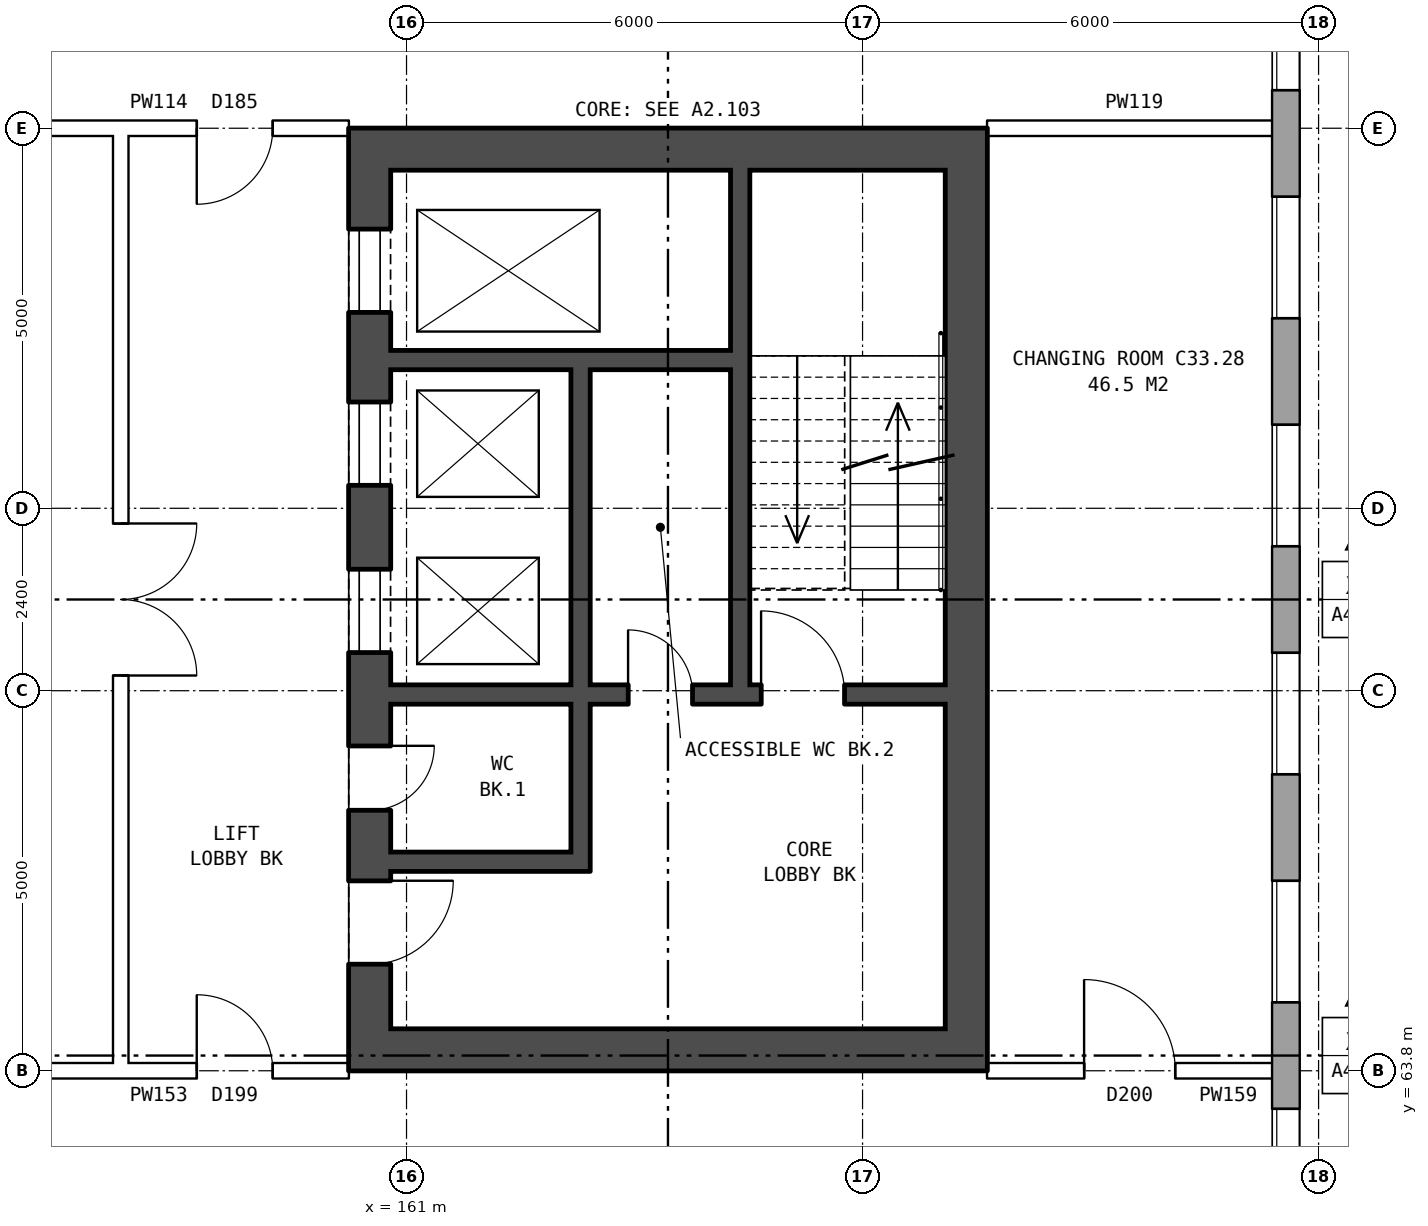
"""IFC4 building model, lengths in metres.
Left out: names, types, materials, properties, quantities, classifications, styles, units other than length and angle.
Written with IfcOpenShell. Run it as: python <this file> out.ifc"""

import sys

from ifc_helpers import new_model, si_unit, direction, frame, frame_2d, origin, place, context, subcontext, project, spatial, rectangle, extrude, element, fill, save


model = new_model("IFC4")
c1 = context("Model", 3, precision=1e-05, world=origin(), true_north=direction((0.0, 1.0)))
c2 = subcontext(c1, "Body", "Model", "MODEL_VIEW")
j1 = project(units=[si_unit("LENGTHUNIT", "METRE"), si_unit("PLANEANGLEUNIT", "RADIAN")], contexts=[c1])
p1 = place(None, origin())
s1 = spatial("IfcSite", under=j1, at=p1, CompositionType="ELEMENT")
p2 = place(p1, origin())
s2 = spatial("IfcBuilding", under=s1, at=p2, CompositionType="ELEMENT")
p3 = place(p2, frame((0.0, 0.0, 119.5)))
s3 = spatial("IfcBuildingStorey", under=s2, at=p3, CompositionType="ELEMENT", Elevation=119.5)
p4 = place(p3, frame((172.57, 57.075, 0.0), z_axis=(0.0, 0.0, 1.0), x_axis=(0.0, 1.0, 0.0)))
e1 = element("IfcWall", 1, at=p4, inside=s3, PredefinedType="STANDARD", context=c2, shape_type="SweptSolid", body=[
    extrude(rectangle(XDim=25.851, YDim=0.36, at=frame_2d((12.925, 0.0))), origin(), (0.0, 0.0, 1.0), 3.6),
])
p5 = place(p4, frame((1.625, 0.0, 0.8)))
e2 = element("IfcOpeningElement", 2, at=p5, cuts=e1, PredefinedType="OPENING", context=c2, shape_type="SweptSolid", body=[
    extrude(rectangle(XDim=1.6, YDim=1.8, at=frame_2d((0.8, 0.9))), frame((0.0, 0.19, 0.0), z_axis=(0.0, -1.0, 0.0), x_axis=(1.0, 0.0, 0.0)), (0.0, 0.0, 1.0), 0.38),
])
p6 = place(p4, frame((4.625, 0.0, 0.8)))
e3 = element("IfcOpeningElement", 3, at=p6, cuts=e1, PredefinedType="OPENING", context=c2, shape_type="SweptSolid", body=[
    extrude(rectangle(XDim=1.6, YDim=1.8, at=frame_2d((0.8, 0.9))), frame((0.0, 0.19, 0.0), z_axis=(0.0, -1.0, 0.0), x_axis=(1.0, 0.0, 0.0)), (0.0, 0.0, 1.0), 0.38),
])
p7 = place(p4, frame((7.625, 0.0, 0.8)))
e4 = element("IfcOpeningElement", 4, at=p7, cuts=e1, PredefinedType="OPENING", context=c2, shape_type="SweptSolid", body=[
    extrude(rectangle(XDim=1.6, YDim=1.8, at=frame_2d((0.8, 0.9))), frame((0.0, 0.19, 0.0), z_axis=(0.0, -1.0, 0.0), x_axis=(1.0, 0.0, 0.0)), (0.0, 0.0, 1.0), 0.38),
])
p8 = place(p4, frame((10.625, 0.0, 0.8)))
e5 = element("IfcOpeningElement", 5, at=p8, cuts=e1, PredefinedType="OPENING", context=c2, shape_type="SweptSolid", body=[
    extrude(rectangle(XDim=1.6, YDim=1.8, at=frame_2d((0.8, 0.9))), frame((0.0, 0.19, 0.0), z_axis=(0.0, -1.0, 0.0), x_axis=(1.0, 0.0, 0.0)), (0.0, 0.0, 1.0), 0.38),
])
p9 = place(p4, frame((13.625, 0.0, 0.8)))
e6 = element("IfcOpeningElement", 6, at=p9, cuts=e1, PredefinedType="OPENING", context=c2, shape_type="SweptSolid", body=[
    extrude(rectangle(XDim=1.6, YDim=1.8, at=frame_2d((0.8, 0.9))), frame((0.0, 0.19, 0.0), z_axis=(0.0, -1.0, 0.0), x_axis=(1.0, 0.0, 0.0)), (0.0, 0.0, 1.0), 0.38),
])
p10 = place(p4, frame((16.625, 0.0, 0.8)))
e7 = element("IfcOpeningElement", 7, at=p10, cuts=e1, PredefinedType="OPENING", context=c2, shape_type="SweptSolid", body=[
    extrude(rectangle(XDim=1.6, YDim=1.8, at=frame_2d((0.8, 0.9))), frame((0.0, 0.19, 0.0), z_axis=(0.0, -1.0, 0.0), x_axis=(1.0, 0.0, 0.0)), (0.0, 0.0, 1.0), 0.38),
])
p11 = place(p4, frame((19.625, 0.0, 0.8)))
e8 = element("IfcOpeningElement", 8, at=p11, cuts=e1, PredefinedType="OPENING", context=c2, shape_type="SweptSolid", body=[
    extrude(rectangle(XDim=1.6, YDim=1.8, at=frame_2d((0.8, 0.9))), frame((0.0, 0.19, 0.0), z_axis=(0.0, -1.0, 0.0), x_axis=(1.0, 0.0, 0.0)), (0.0, 0.0, 1.0), 0.38),
])
p12 = place(p4, frame((22.625, 0.0, 0.8)))
e9 = element("IfcOpeningElement", 9, at=p12, cuts=e1, PredefinedType="OPENING", context=c2, shape_type="SweptSolid", body=[
    extrude(rectangle(XDim=1.6, YDim=1.8, at=frame_2d((0.8, 0.9))), frame((0.0, 0.19, 0.0), z_axis=(0.0, -1.0, 0.0), x_axis=(1.0, 0.0, 0.0)), (0.0, 0.0, 1.0), 0.38),
])
p13 = place(p3, frame((160.515, 76.2, 0.0), z_axis=(0.0, 0.0, 1.0), x_axis=(0.0, -1.0, 0.0)))
e10 = element("IfcWall", 10, at=p13, inside=s3, PredefinedType="SHEAR", context=c2, shape_type="SweptSolid", body=[
    extrude(rectangle(XDim=12.4, YDim=0.55, at=frame_2d((6.2, 0.0))), origin(), (0.0, 0.0, 1.0), 3.6),
])
p14 = place(p13, frame((1.325, 0.0, 0.0)))
e11 = element("IfcOpeningElement", 11, at=p14, cuts=e10, PredefinedType="OPENING", context=c2, shape_type="SweptSolid", body=[
    extrude(rectangle(XDim=1.1, YDim=2.1, at=frame_2d((0.55, 1.05))), frame((0.0, 0.285, 0.0), z_axis=(0.0, -1.0, 0.0), x_axis=(1.0, 0.0, 0.0)), (0.0, 0.0, 1.0), 0.57),
])
p15 = place(p13, frame((3.6, 0.0, 0.0)))
e12 = element("IfcOpeningElement", 12, at=p15, cuts=e10, PredefinedType="OPENING", context=c2, shape_type="SweptSolid", body=[
    extrude(rectangle(XDim=1.1, YDim=2.1, at=frame_2d((0.55, 1.05))), frame((0.0, 0.285, 0.0), z_axis=(0.0, -1.0, 0.0), x_axis=(1.0, 0.0, 0.0)), (0.0, 0.0, 1.0), 0.57),
])
p16 = place(p13, frame((5.8, 0.0, 0.0)))
e13 = element("IfcOpeningElement", 13, at=p16, cuts=e10, PredefinedType="OPENING", context=c2, shape_type="SweptSolid", body=[
    extrude(rectangle(XDim=1.1, YDim=2.1, at=frame_2d((0.55, 1.05))), frame((0.0, 0.285, 0.0), z_axis=(0.0, -1.0, 0.0), x_axis=(1.0, 0.0, 0.0)), (0.0, 0.0, 1.0), 0.57),
])
p17 = place(p13, frame((9.9, 0.0, 0.0)))
e14 = element("IfcOpeningElement", 14, at=p17, cuts=e10, PredefinedType="OPENING", context=c2, shape_type="SweptSolid", body=[
    extrude(rectangle(XDim=1.1, YDim=2.1, at=frame_2d((0.55, 1.05))), frame((0.0, 0.285, 0.0), z_axis=(0.0, -1.0, 0.0), x_axis=(1.0, 0.0, 0.0)), (0.0, 0.0, 1.0), 0.57),
])
p18 = place(p13, frame((8.125, 0.0, 0.0)))
e15 = element("IfcOpeningElement", 15, at=p18, cuts=e10, PredefinedType="OPENING", context=c2, shape_type="SweptSolid", body=[
    extrude(rectangle(XDim=0.85, YDim=2.1, at=frame_2d((0.425, 1.05))), frame((0.0, 0.285, 0.0), z_axis=(0.0, -1.0, 0.0), x_axis=(1.0, 0.0, 0.0)), (0.0, 0.0, 1.0), 0.57),
])
p19 = place(p3, frame((168.365, 76.2, 0.0), z_axis=(0.0, 0.0, 1.0), x_axis=(0.0, -1.0, 0.0)))
e16 = element("IfcWall", 16, at=p19, inside=s3, PredefinedType="SHEAR", context=c2, shape_type="SweptSolid", body=[
    extrude(rectangle(XDim=12.4, YDim=0.55, at=frame_2d((6.2, 0.0))), origin(), (0.0, 0.0, 1.0), 3.6),
])
for number, where, z_axis, x_axis in (
    (17, (160.79, 75.925, 0.0), (0.0, 0.0, 1.0), (1.0, 0.0, 0.0)),
    (18, (160.79, 64.075, 0.0), (0.0, 0.0, 1.0), (1.0, 0.0, 0.0)),
):
    element("IfcWall", number, at=place(p3, frame(where, z_axis=z_axis, x_axis=x_axis)), inside=s3, PredefinedType="SHEAR", context=c2, shape_type="SweptSolid", body=[
        extrude(rectangle(XDim=7.3, YDim=0.55, at=frame_2d((3.65, 0.0))), origin(), (0.0, 0.0, 1.0), 3.6),
    ])
p20 = place(p3, frame((160.79, 73.15, 0.0), z_axis=(0.0, 0.0, 1.0), x_axis=(1.0, 0.0, 0.0)))
e19 = element("IfcWall", 19, at=p20, inside=s3, PredefinedType="SHEAR", context=c2, shape_type="SweptSolid", body=[
    extrude(rectangle(XDim=4.475, YDim=0.25, at=frame_2d((2.237, 0.0))), origin(), (0.0, 0.0, 1.0), 3.6),
])
p21 = place(p3, frame((160.79, 68.75, 0.0), z_axis=(0.0, 0.0, 1.0), x_axis=(1.0, 0.0, 0.0)))
e20 = element("IfcWall", 20, at=p21, inside=s3, PredefinedType="SHEAR", context=c2, shape_type="SweptSolid", body=[
    extrude(rectangle(XDim=7.3, YDim=0.25, at=frame_2d((3.65, 0.0))), origin(), (0.0, 0.0, 1.0), 3.6),
])
p22 = place(p21, frame((4.875, 0.0, 0.0)))
e21 = element("IfcOpeningElement", 21, at=p22, cuts=e20, PredefinedType="OPENING", context=c2, shape_type="SweptSolid", body=[
    extrude(rectangle(XDim=1.1, YDim=2.1, at=frame_2d((0.55, 1.05))), frame((0.0, 0.135, 0.0), z_axis=(0.0, -1.0, 0.0), x_axis=(1.0, 0.0, 0.0)), (0.0, 0.0, 1.0), 0.27),
])
p23 = place(p21, frame((3.125, 0.0, 0.0)))
e22 = element("IfcOpeningElement", 22, at=p23, cuts=e20, PredefinedType="OPENING", context=c2, shape_type="SweptSolid", body=[
    extrude(rectangle(XDim=0.85, YDim=2.1, at=frame_2d((0.425, 1.05))), frame((0.0, 0.135, 0.0), z_axis=(0.0, -1.0, 0.0), x_axis=(1.0, 0.0, 0.0)), (0.0, 0.0, 1.0), 0.27),
])
p24 = place(p3, frame((160.79, 66.55, 0.0), z_axis=(0.0, 0.0, 1.0), x_axis=(1.0, 0.0, 0.0)))
e23 = element("IfcWall", 23, at=p24, inside=s3, PredefinedType="SHEAR", context=c2, shape_type="SweptSolid", body=[
    extrude(rectangle(XDim=2.375, YDim=0.25, at=frame_2d((1.188, 0.0))), origin(), (0.0, 0.0, 1.0), 3.6),
])
p25 = place(p3, frame((163.29, 73.025, 0.0), z_axis=(0.0, 0.0, 1.0), x_axis=(0.0, -1.0, 0.0)))
e24 = element("IfcWall", 24, at=p25, inside=s3, PredefinedType="SHEAR", context=c2, shape_type="SweptSolid", body=[
    extrude(rectangle(XDim=4.15, YDim=0.25, at=frame_2d((2.075, 0.0))), origin(), (0.0, 0.0, 1.0), 3.6),
])
p26 = place(p3, frame((163.29, 68.625, 0.0), z_axis=(0.0, 0.0, 1.0), x_axis=(0.0, -1.0, 0.0)))
e25 = element("IfcWall", 25, at=p26, inside=s3, PredefinedType="SHEAR", context=c2, shape_type="SweptSolid", body=[
    extrude(rectangle(XDim=2.2, YDim=0.25, at=frame_2d((1.1, 0.0))), origin(), (0.0, 0.0, 1.0), 3.6),
])
p27 = place(p3, frame((165.39, 75.65, 0.0), z_axis=(0.0, 0.0, 1.0), x_axis=(0.0, -1.0, 0.0)))
e26 = element("IfcWall", 26, at=p27, inside=s3, PredefinedType="SHEAR", context=c2, shape_type="SweptSolid", body=[
    extrude(rectangle(XDim=6.775, YDim=0.25, at=frame_2d((3.387, 0.0))), origin(), (0.0, 0.0, 1.0), 3.6),
])
p28 = place(p3, frame((157.24, 63.9, 0.0), z_axis=(0.0, 0.0, 1.0), x_axis=(0.0, 1.0, 0.0)))
e27 = element("IfcWall", 27, at=p28, inside=s3, PredefinedType="PARTITIONING", context=c2, shape_type="SweptSolid", body=[
    extrude(rectangle(XDim=12.2, YDim=0.2, at=frame_2d((6.1, 0.0))), origin(), (0.0, 0.0, 1.0), 3.6),
])
p29 = place(p28, frame((5.1, 0.0, 0.0)))
e28 = element("IfcOpeningElement", 28, at=p29, cuts=e27, PredefinedType="OPENING", context=c2, shape_type="SweptSolid", body=[
    extrude(rectangle(XDim=2.0, YDim=2.1, at=frame_2d((1.0, 1.05))), frame((0.0, 0.11, 0.0), z_axis=(0.0, -1.0, 0.0), x_axis=(1.0, 0.0, 0.0)), (0.0, 0.0, 1.0), 0.22),
])
p30 = place(p3, frame((142.76, 63.8, 0.0), z_axis=(0.0, 0.0, 1.0), x_axis=(1.0, 0.0, 0.0)))
e29 = element("IfcWall", 29, at=p30, inside=s3, PredefinedType="PARTITIONING", context=c2, shape_type="SweptSolid", body=[
    extrude(rectangle(XDim=14.48, YDim=0.2, at=frame_2d((7.24, 0.0))), origin(), (0.0, 0.0, 1.0), 3.6),
])
p31 = place(p30, frame((6.34, 0.0, 0.0)))
e30 = element("IfcOpeningElement", 30, at=p31, cuts=e29, PredefinedType="OPENING", context=c2, shape_type="SweptSolid", body=[
    extrude(rectangle(XDim=1.8, YDim=2.1, at=frame_2d((0.9, 1.05))), frame((0.0, 0.11, 0.0), z_axis=(0.0, -1.0, 0.0), x_axis=(1.0, 0.0, 0.0)), (0.0, 0.0, 1.0), 0.22),
])
p32 = place(p3, frame((168.64, 63.8, 0.0), z_axis=(0.0, 0.0, 1.0), x_axis=(1.0, 0.0, 0.0)))
e31 = element("IfcWall", 31, at=p32, inside=s3, PredefinedType="PARTITIONING", context=c2, shape_type="SweptSolid", body=[
    extrude(rectangle(XDim=3.87, YDim=0.2, at=frame_2d((1.935, 0.0))), origin(), (0.0, 0.0, 1.0), 3.6),
])
p33 = place(p32, frame((1.275, 0.0, 0.0)))
e32 = element("IfcOpeningElement", 32, at=p33, cuts=e31, PredefinedType="OPENING", context=c2, shape_type="SweptSolid", body=[
    extrude(rectangle(XDim=1.2, YDim=2.1, at=frame_2d((0.6, 1.05))), frame((0.0, 0.11, 0.0), z_axis=(0.0, -1.0, 0.0), x_axis=(1.0, 0.0, 0.0)), (0.0, 0.0, 1.0), 0.22),
])
p34 = place(p3, frame((157.24, 63.8, 0.0), z_axis=(0.0, 0.0, 1.0), x_axis=(1.0, 0.0, 0.0)))
e33 = element("IfcWall", 33, at=p34, inside=s3, PredefinedType="PARTITIONING", context=c2, shape_type="SweptSolid", body=[
    extrude(rectangle(XDim=3.0, YDim=0.2, at=frame_2d((1.5, 0.0))), origin(), (0.0, 0.0, 1.0), 3.6),
])
p35 = place(p34, frame((1.0, 0.0, 0.0)))
e34 = element("IfcOpeningElement", 34, at=p35, cuts=e33, PredefinedType="OPENING", context=c2, shape_type="SweptSolid", body=[
    extrude(rectangle(XDim=1.0, YDim=2.1, at=frame_2d((0.5, 1.05))), frame((0.0, 0.11, 0.0), z_axis=(0.0, -1.0, 0.0), x_axis=(1.0, 0.0, 0.0)), (0.0, 0.0, 1.0), 0.22),
])
p36 = place(p3, frame((142.76, 76.2, 0.0), z_axis=(0.0, 0.0, 1.0), x_axis=(1.0, 0.0, 0.0)))
e35 = element("IfcWall", 35, at=p36, inside=s3, PredefinedType="PARTITIONING", context=c2, shape_type="SweptSolid", body=[
    extrude(rectangle(XDim=14.48, YDim=0.2, at=frame_2d((7.24, 0.0))), origin(), (0.0, 0.0, 1.0), 3.6),
])
p37 = place(p36, frame((6.34, 0.0, 0.0)))
e36 = element("IfcOpeningElement", 36, at=p37, cuts=e35, PredefinedType="OPENING", context=c2, shape_type="SweptSolid", body=[
    extrude(rectangle(XDim=1.8, YDim=2.1, at=frame_2d((0.9, 1.05))), frame((0.0, 0.11, 0.0), z_axis=(0.0, -1.0, 0.0), x_axis=(1.0, 0.0, 0.0)), (0.0, 0.0, 1.0), 0.22),
])
p38 = place(p3, frame((168.64, 76.2, 0.0), z_axis=(0.0, 0.0, 1.0), x_axis=(1.0, 0.0, 0.0)))
e37 = element("IfcWall", 37, at=p38, inside=s3, PredefinedType="PARTITIONING", context=c2, shape_type="SweptSolid", body=[
    extrude(rectangle(XDim=3.87, YDim=0.2, at=frame_2d((1.935, 0.0))), origin(), (0.0, 0.0, 1.0), 3.6),
])
p39 = place(p3, frame((157.24, 76.2, 0.0), z_axis=(0.0, 0.0, 1.0), x_axis=(1.0, 0.0, 0.0)))
e38 = element("IfcWall", 38, at=p39, inside=s3, PredefinedType="PARTITIONING", context=c2, shape_type="SweptSolid", body=[
    extrude(rectangle(XDim=3.0, YDim=0.2, at=frame_2d((1.5, 0.0))), origin(), (0.0, 0.0, 1.0), 3.6),
])
p40 = place(p39, frame((1.0, 0.0, 0.0)))
e39 = element("IfcOpeningElement", 39, at=p40, cuts=e38, PredefinedType="OPENING", context=c2, shape_type="SweptSolid", body=[
    extrude(rectangle(XDim=1.0, YDim=2.1, at=frame_2d((0.5, 1.05))), frame((0.0, 0.11, 0.0), z_axis=(0.0, -1.0, 0.0), x_axis=(1.0, 0.0, 0.0)), (0.0, 0.0, 1.0), 0.22),
])
p41 = place(p6, origin())
e40 = element("IfcWindow", 40, at=p41, inside=s3, PartitioningType="SINGLE_PANEL", PredefinedType="WINDOW", context=c2, shape_type="SweptSolid", body=[
    extrude(rectangle(XDim=1.6, YDim=1.8, at=frame_2d((0.8, 0.9))), frame((0.0, 0.15, 0.0), z_axis=(0.0, -1.0, 0.0), x_axis=(1.0, 0.0, 0.0)), (0.0, 0.0, 1.0), 0.06),
])
fill(e3, e40)
p42 = place(p7, origin())
e41 = element("IfcWindow", 41, at=p42, inside=s3, PartitioningType="SINGLE_PANEL", PredefinedType="WINDOW", context=c2, shape_type="SweptSolid", body=[
    extrude(rectangle(XDim=1.6, YDim=1.8, at=frame_2d((0.8, 0.9))), frame((0.0, 0.15, 0.0), z_axis=(0.0, -1.0, 0.0), x_axis=(1.0, 0.0, 0.0)), (0.0, 0.0, 1.0), 0.06),
])
fill(e4, e41)
p43 = place(p8, origin())
e42 = element("IfcWindow", 42, at=p43, inside=s3, PartitioningType="SINGLE_PANEL", PredefinedType="WINDOW", context=c2, shape_type="SweptSolid", body=[
    extrude(rectangle(XDim=1.6, YDim=1.8, at=frame_2d((0.8, 0.9))), frame((0.0, 0.15, 0.0), z_axis=(0.0, -1.0, 0.0), x_axis=(1.0, 0.0, 0.0)), (0.0, 0.0, 1.0), 0.06),
])
fill(e5, e42)
p44 = place(p9, origin())
e43 = element("IfcWindow", 43, at=p44, inside=s3, PartitioningType="SINGLE_PANEL", PredefinedType="WINDOW", context=c2, shape_type="SweptSolid", body=[
    extrude(rectangle(XDim=1.6, YDim=1.8, at=frame_2d((0.8, 0.9))), frame((0.0, 0.15, 0.0), z_axis=(0.0, -1.0, 0.0), x_axis=(1.0, 0.0, 0.0)), (0.0, 0.0, 1.0), 0.06),
])
fill(e6, e43)
p45 = place(p10, origin())
e44 = element("IfcWindow", 44, at=p45, inside=s3, PartitioningType="SINGLE_PANEL", PredefinedType="WINDOW", context=c2, shape_type="SweptSolid", body=[
    extrude(rectangle(XDim=1.6, YDim=1.8, at=frame_2d((0.8, 0.9))), frame((0.0, 0.15, 0.0), z_axis=(0.0, -1.0, 0.0), x_axis=(1.0, 0.0, 0.0)), (0.0, 0.0, 1.0), 0.06),
])
fill(e7, e44)
p46 = place(p11, origin())
e45 = element("IfcWindow", 45, at=p46, inside=s3, PartitioningType="SINGLE_PANEL", PredefinedType="WINDOW", context=c2, shape_type="SweptSolid", body=[
    extrude(rectangle(XDim=1.6, YDim=1.8, at=frame_2d((0.8, 0.9))), frame((0.0, 0.15, 0.0), z_axis=(0.0, -1.0, 0.0), x_axis=(1.0, 0.0, 0.0)), (0.0, 0.0, 1.0), 0.06),
])
fill(e8, e45)
p47 = place(p14, origin())
e46 = element("IfcDoor", 46, at=p47, inside=s3, OperationType="DOUBLE_DOOR_SLIDING", PredefinedType="DOOR", context=c2, shape_type="SweptSolid", body=[
    extrude(rectangle(XDim=1.1, YDim=2.1, at=frame_2d((0.55, 1.05))), frame((0.0, 0.26, 0.0), z_axis=(0.0, -1.0, 0.0), x_axis=(1.0, 0.0, 0.0)), (0.0, 0.0, 1.0), 0.05),
])
fill(e11, e46)
p48 = place(p15, origin())
e47 = element("IfcDoor", 47, at=p48, inside=s3, OperationType="DOUBLE_DOOR_SLIDING", PredefinedType="DOOR", context=c2, shape_type="SweptSolid", body=[
    extrude(rectangle(XDim=1.1, YDim=2.1, at=frame_2d((0.55, 1.05))), frame((0.0, 0.26, 0.0), z_axis=(0.0, -1.0, 0.0), x_axis=(1.0, 0.0, 0.0)), (0.0, 0.0, 1.0), 0.05),
])
fill(e12, e47)
p49 = place(p16, origin())
e48 = element("IfcDoor", 48, at=p49, inside=s3, OperationType="DOUBLE_DOOR_SLIDING", PredefinedType="DOOR", context=c2, shape_type="SweptSolid", body=[
    extrude(rectangle(XDim=1.1, YDim=2.1, at=frame_2d((0.55, 1.05))), frame((0.0, 0.26, 0.0), z_axis=(0.0, -1.0, 0.0), x_axis=(1.0, 0.0, 0.0)), (0.0, 0.0, 1.0), 0.05),
])
fill(e13, e48)
p50 = place(p17, origin())
e49 = element("IfcDoor", 49, at=p50, inside=s3, OperationType="SINGLE_SWING_LEFT", PredefinedType="DOOR", context=c2, shape_type="SweptSolid", body=[
    extrude(rectangle(XDim=1.1, YDim=2.1, at=frame_2d((0.55, 1.05))), frame((0.0, 0.26, 0.0), z_axis=(0.0, -1.0, 0.0), x_axis=(1.0, 0.0, 0.0)), (0.0, 0.0, 1.0), 0.05),
])
fill(e14, e49)
p51 = place(p22, origin())
e50 = element("IfcDoor", 50, at=p51, inside=s3, OperationType="SINGLE_SWING_LEFT", PredefinedType="DOOR", context=c2, shape_type="SweptSolid", body=[
    extrude(rectangle(XDim=1.1, YDim=2.1, at=frame_2d((0.55, 1.05))), frame((0.0, 0.025, 0.0), z_axis=(0.0, -1.0, 0.0), x_axis=(1.0, 0.0, 0.0)), (0.0, 0.0, 1.0), 0.05),
])
fill(e21, e50)
p52 = place(p18, origin())
e51 = element("IfcDoor", 51, at=p52, inside=s3, OperationType="SINGLE_SWING_LEFT", PredefinedType="DOOR", context=c2, shape_type="SweptSolid", body=[
    extrude(rectangle(XDim=0.85, YDim=2.1, at=frame_2d((0.425, 1.05))), frame((0.0, 0.26, 0.0), z_axis=(0.0, -1.0, 0.0), x_axis=(1.0, 0.0, 0.0)), (0.0, 0.0, 1.0), 0.05),
])
fill(e15, e51)
p53 = place(p23, origin())
e52 = element("IfcDoor", 52, at=p53, inside=s3, OperationType="SINGLE_SWING_LEFT", PredefinedType="DOOR", context=c2, shape_type="SweptSolid", body=[
    extrude(rectangle(XDim=0.85, YDim=2.1, at=frame_2d((0.425, 1.05))), frame((0.0, 0.025, 0.0), z_axis=(0.0, -1.0, 0.0), x_axis=(1.0, 0.0, 0.0)), (0.0, 0.0, 1.0), 0.05),
])
fill(e22, e52)
p54 = place(p29, frame((2.0, 0.0, 0.0), z_axis=(0.0, 0.0, 1.0), x_axis=(-1.0, 0.0, 0.0)))
e53 = element("IfcDoor", 53, at=p54, inside=s3, OperationType="DOUBLE_DOOR_SINGLE_SWING", PredefinedType="DOOR", context=c2, shape_type="SweptSolid", body=[
    extrude(rectangle(XDim=2.0, YDim=2.1, at=frame_2d((1.0, 1.05))), frame((0.0, 0.025, 0.0), z_axis=(0.0, -1.0, 0.0), x_axis=(1.0, 0.0, 0.0)), (0.0, 0.0, 1.0), 0.05),
])
fill(e28, e53)
p55 = place(p33, origin())
e54 = element("IfcDoor", 54, at=p55, inside=s3, OperationType="SINGLE_SWING_LEFT", PredefinedType="DOOR", context=c2, shape_type="SweptSolid", body=[
    extrude(rectangle(XDim=1.2, YDim=2.1, at=frame_2d((0.6, 1.05))), frame((0.0, 0.025, 0.0), z_axis=(0.0, -1.0, 0.0), x_axis=(1.0, 0.0, 0.0)), (0.0, 0.0, 1.0), 0.05),
])
fill(e32, e54)
p56 = place(p35, origin())
e55 = element("IfcDoor", 55, at=p56, inside=s3, OperationType="SINGLE_SWING_LEFT", PredefinedType="DOOR", context=c2, shape_type="SweptSolid", body=[
    extrude(rectangle(XDim=1.0, YDim=2.1, at=frame_2d((0.5, 1.05))), frame((0.0, 0.025, 0.0), z_axis=(0.0, -1.0, 0.0), x_axis=(1.0, 0.0, 0.0)), (0.0, 0.0, 1.0), 0.05),
])
fill(e34, e55)
p57 = place(p40, frame((1.0, 0.0, 0.0), z_axis=(0.0, 0.0, 1.0), x_axis=(-1.0, 0.0, 0.0)))
e56 = element("IfcDoor", 56, at=p57, inside=s3, OperationType="SINGLE_SWING_RIGHT", PredefinedType="DOOR", context=c2, shape_type="SweptSolid", body=[
    extrude(rectangle(XDim=1.0, YDim=2.1, at=frame_2d((0.5, 1.05))), frame((0.0, 0.025, 0.0), z_axis=(0.0, -1.0, 0.0), x_axis=(1.0, 0.0, 0.0)), (0.0, 0.0, 1.0), 0.05),
])
fill(e39, e56)
save(model, sys.argv[1])
